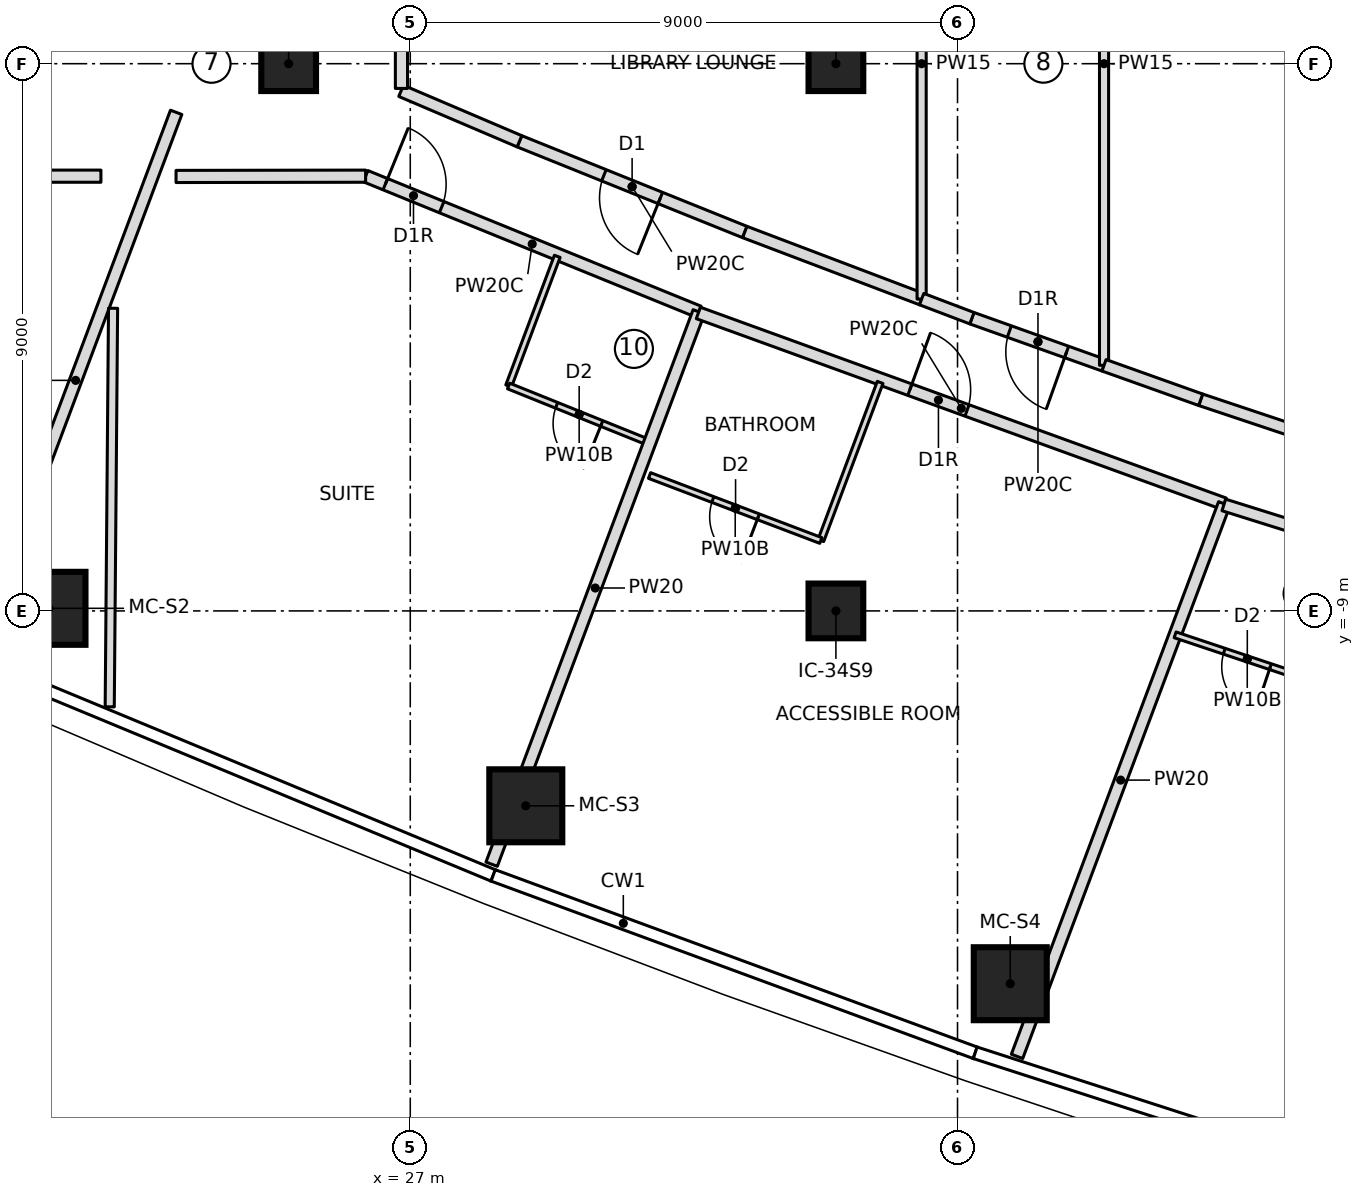
"""IFC4 building model, lengths in metres.
Left out: names, types, materials, properties, quantities, classifications, styles, units other than length and angle.
Written with IfcOpenShell. Run it as: python <this file> out.ifc"""

import sys

from ifc_helpers import new_model, si_unit, direction, frame, frame_2d, origin, origin_2d, place, context, subcontext, project, spatial, rectangle, extrude, element, fill, save


model = new_model("IFC4")
c1 = context("Model", 3, precision=1e-05, world=origin(), true_north=direction((0.0, 1.0)))
c2 = subcontext(c1, "Body", "Model", "MODEL_VIEW")
j1 = project(units=[si_unit("LENGTHUNIT", "METRE"), si_unit("PLANEANGLEUNIT", "RADIAN")], contexts=[c1])
p1 = place(None, origin())
s1 = spatial("IfcSite", under=j1, at=p1, CompositionType="ELEMENT")
p2 = place(p1, origin())
s2 = spatial("IfcBuilding", under=s1, at=p2, CompositionType="ELEMENT")
p3 = place(p2, frame((0.0, 0.0, 238.55)))
s3 = spatial("IfcBuildingStorey", under=s2, at=p3, CompositionType="ELEMENT", Elevation=238.55)
for number, where, z_axis, x_axis in (
    (1, (21.059, -8.958, 0.0), (0.0, 0.0, 1.0), (1.0, 0.0, 0.0)),
    (2, (28.9, -12.205, 0.0), (0.0, 0.0, 1.0), (1.0, 0.0, 0.0)),
    (3, (36.867, -15.132, 0.0), (0.0, 0.0, 1.0), (1.0, 0.0, 0.0)),
):
    element("IfcColumn", number, at=place(p3, frame(where, z_axis=z_axis, x_axis=x_axis)), inside=s3, PredefinedType="COLUMN", context=c2, shape_type="SweptSolid", body=[
        extrude(rectangle(XDim=1.2, YDim=1.2, at=origin_2d()), origin(), (0.0, 0.0, 1.0), 3.55),
    ])
for number, where, z_axis, x_axis in (
    (4, (25.0, 0.0, 0.0), (0.0, 0.0, 1.0), (1.0, 0.0, 0.0)),
    (5, (34.0, -9.0, 0.0), (0.0, 0.0, 1.0), (1.0, 0.0, 0.0)),
    (6, (34.0, 0.0, 0.0), (0.0, 0.0, 1.0), (1.0, 0.0, 0.0)),
):
    element("IfcColumn", number, at=place(p3, frame(where, z_axis=z_axis, x_axis=x_axis)), inside=s3, PredefinedType="COLUMN", context=c2, shape_type="SweptSolid", body=[
        extrude(rectangle(XDim=0.9, YDim=0.9, at=origin_2d()), origin(), (0.0, 0.0, 1.0), 3.55),
    ])
p4 = place(p3, frame((6.725, -1.85, 0.0), z_axis=(0.0, 0.0, 1.0), x_axis=(1.0, 0.0, 0.0)))
e7 = element("IfcWall", 7, at=p4, inside=s3, PredefinedType="PARTITIONING", context=c2, shape_type="SweptSolid", body=[
    extrude(rectangle(XDim=15.188, YDim=0.2, at=frame_2d((7.594, 0.0))), origin(), (0.0, 0.0, 1.0), 3.25),
])
p5 = place(p4, frame((7.257, 0.0, 0.0)))
e8 = element("IfcOpeningElement", 8, at=p5, cuts=e7, PredefinedType="OPENING", context=c2, shape_type="SweptSolid", body=[
    extrude(rectangle(XDim=1.0, YDim=2.1, at=frame_2d((0.5, 1.05))), frame((0.0, 0.11, 0.0), z_axis=(0.0, -1.0, 0.0), x_axis=(1.0, 0.0, 0.0)), (0.0, 0.0, 1.0), 0.22),
])
p6 = place(p3, frame((19.844, -9.616, 0.0), z_axis=(0.0, 0.0, 1.0), x_axis=(0.351123441588, 0.936329177569, 0.0)))
e9 = element("IfcWall", 9, at=p6, inside=s3, PredefinedType="PARTITIONING", context=c2, shape_type="SweptSolid", body=[
    extrude(rectangle(XDim=9.416, YDim=0.2, at=frame_2d((4.708, 0.0))), origin(), (0.0, 0.0, 1.0), 3.25),
])
p7 = place(p3, frame((26.266, -1.85, 0.0), z_axis=(0.0, 0.0, 1.0), x_axis=(0.926191125494, -0.377054371486, 0.0)))
e10 = element("IfcWall", 10, at=p7, inside=s3, PredefinedType="PARTITIONING", context=c2, shape_type="SweptSolid", body=[
    extrude(rectangle(XDim=5.916, YDim=0.2, at=frame_2d((2.958, 0.0))), origin(), (0.0, 0.0, 1.0), 3.25),
])
p8 = place(p7, frame((0.35, 0.0, 0.0)))
e11 = element("IfcOpeningElement", 11, at=p8, cuts=e10, PredefinedType="OPENING", context=c2, shape_type="SweptSolid", body=[
    extrude(rectangle(XDim=1.0, YDim=2.1, at=frame_2d((0.5, 1.05))), frame((0.0, 0.11, 0.0), z_axis=(0.0, -1.0, 0.0), x_axis=(1.0, 0.0, 0.0)), (0.0, 0.0, 1.0), 0.22),
])
p9 = place(p3, frame((28.618, -5.301, 0.0), z_axis=(0.0, 0.0, 1.0), x_axis=(0.351064703731, 0.936351202164, 0.0)))
e12 = element("IfcWall", 12, at=p9, inside=s3, PredefinedType="PARTITIONING", context=c2, shape_type="SweptSolid", body=[
    extrude(rectangle(XDim=2.278, YDim=0.1, at=frame_2d((1.139, 0.0))), origin(), (0.0, 0.0, 1.0), 3.25),
])
p10 = place(p3, frame((30.938, -6.235, 0.0), z_axis=(0.0, 0.0, 1.0), x_axis=(-0.92761232595, 0.373544338394, 0.0)))
e13 = element("IfcWall", 13, at=p10, inside=s3, PredefinedType="PARTITIONING", context=c2, shape_type="SweptSolid", body=[
    extrude(rectangle(XDim=2.5, YDim=0.1, at=frame_2d((1.25, 0.0))), origin(), (0.0, 0.0, 1.0), 3.25),
])
p11 = place(p10, frame((0.85, 0.0, 0.0)))
e14 = element("IfcOpeningElement", 14, at=p11, cuts=e13, PredefinedType="OPENING", context=c2, shape_type="SweptSolid", body=[
    extrude(rectangle(XDim=0.8, YDim=2.1, at=frame_2d((0.4, 1.05))), frame((0.0, 0.06, 0.0), z_axis=(0.0, -1.0, 0.0), x_axis=(1.0, 0.0, 0.0)), (0.0, 0.0, 1.0), 0.12),
])
p12 = place(p3, frame((28.338, -13.166, 0.0), z_axis=(0.0, 0.0, 1.0), x_axis=(0.351126198992, 0.936328143538, 0.0)))
e15 = element("IfcWall", 15, at=p12, inside=s3, PredefinedType="PARTITIONING", context=c2, shape_type="SweptSolid", body=[
    extrude(rectangle(XDim=9.703, YDim=0.2, at=frame_2d((4.852, 0.0))), origin(), (0.0, 0.0, 1.0), 3.25),
])
p13 = place(p3, frame((31.738, -4.1, 0.0), z_axis=(0.0, 0.0, 1.0), x_axis=(0.940010170527, -0.341146419159, 0.0)))
e16 = element("IfcWall", 16, at=p13, inside=s3, PredefinedType="PARTITIONING", context=c2, shape_type="SweptSolid", body=[
    extrude(rectangle(XDim=9.2, YDim=0.2, at=frame_2d((4.6, 0.0))), origin(), (0.0, 0.0, 1.0), 3.25),
])
p14 = place(p13, frame((3.7, 0.0, 0.0)))
e17 = element("IfcOpeningElement", 17, at=p14, cuts=e16, PredefinedType="OPENING", context=c2, shape_type="SweptSolid", body=[
    extrude(rectangle(XDim=1.0, YDim=2.1, at=frame_2d((0.5, 1.05))), frame((0.0, 0.11, 0.0), z_axis=(0.0, -1.0, 0.0), x_axis=(1.0, 0.0, 0.0)), (0.0, 0.0, 1.0), 0.22),
])
p15 = place(p3, frame((34.728, -5.242, 0.0), z_axis=(0.0, 0.0, 1.0), x_axis=(-0.351113807562, -0.936332790272, 0.0)))
e18 = element("IfcWall", 18, at=p15, inside=s3, PredefinedType="PARTITIONING", context=c2, shape_type="SweptSolid", body=[
    extrude(rectangle(XDim=2.777, YDim=0.1, at=frame_2d((1.389, 0.0))), origin(), (0.0, 0.0, 1.0), 3.25),
])
p16 = place(p3, frame((33.752, -7.842, 0.0), z_axis=(0.0, 0.0, 1.0), x_axis=(-0.934929871592, 0.354832545302, 0.0)))
e19 = element("IfcWall", 19, at=p16, inside=s3, PredefinedType="PARTITIONING", context=c2, shape_type="SweptSolid", body=[
    extrude(rectangle(XDim=3.013, YDim=0.1, at=frame_2d((1.506, 0.0))), origin(), (0.0, 0.0, 1.0), 3.25),
])
p17 = place(p16, frame((1.1, 0.0, 0.0)))
e20 = element("IfcOpeningElement", 20, at=p17, cuts=e19, PredefinedType="OPENING", context=c2, shape_type="SweptSolid", body=[
    extrude(rectangle(XDim=0.8, YDim=2.1, at=frame_2d((0.4, 1.05))), frame((0.0, 0.06, 0.0), z_axis=(0.0, -1.0, 0.0), x_axis=(1.0, 0.0, 0.0)), (0.0, 0.0, 1.0), 0.12),
])
p18 = place(p3, frame((36.979, -16.327, 0.0), z_axis=(0.0, 0.0, 1.0), x_axis=(0.351098633881, 0.936338480084, 0.0)))
e21 = element("IfcWall", 21, at=p18, inside=s3, PredefinedType="PARTITIONING", context=c2, shape_type="SweptSolid", body=[
    extrude(rectangle(XDim=9.707, YDim=0.2, at=frame_2d((4.853, 0.0))), origin(), (0.0, 0.0, 1.0), 3.25),
])
p19 = place(p3, frame((41.951, -10.186, 0.0), z_axis=(0.0, 0.0, 1.0), x_axis=(-0.948468383404, 0.316871781141, 0.0)))
e22 = element("IfcWall", 22, at=p19, inside=s3, PredefinedType="PARTITIONING", context=c2, shape_type="SweptSolid", body=[
    extrude(rectangle(XDim=2.502, YDim=0.1, at=frame_2d((1.251, 0.0))), origin(), (0.0, 0.0, 1.0), 3.25),
])
p20 = place(p19, frame((0.85, 0.0, 0.0)))
e23 = element("IfcOpeningElement", 23, at=p20, cuts=e22, PredefinedType="OPENING", context=c2, shape_type="SweptSolid", body=[
    extrude(rectangle(XDim=0.8, YDim=2.1, at=frame_2d((0.4, 1.05))), frame((0.0, 0.06, 0.0), z_axis=(0.0, -1.0, 0.0), x_axis=(1.0, 0.0, 0.0)), (0.0, 0.0, 1.0), 0.12),
])
p21 = place(p3, frame((32.501, -2.768, 0.0), z_axis=(0.0, 0.0, 1.0), x_axis=(-0.927622894464, 0.373518092823, 0.0)))
e24 = element("IfcWall", 24, at=p21, inside=s3, PredefinedType="PARTITIONING", context=c2, shape_type="SweptSolid", body=[
    extrude(rectangle(XDim=3.995, YDim=0.2, at=frame_2d((1.998, 0.0))), origin(), (0.0, 0.0, 1.0), 3.25),
])
p22 = place(p21, frame((1.498, 0.0, 0.0)))
e25 = element("IfcOpeningElement", 25, at=p22, cuts=e24, PredefinedType="OPENING", context=c2, shape_type="SweptSolid", body=[
    extrude(rectangle(XDim=1.0, YDim=2.1, at=frame_2d((0.5, 1.05))), frame((0.0, 0.11, 0.0), z_axis=(0.0, -1.0, 0.0), x_axis=(1.0, 0.0, 0.0)), (0.0, 0.0, 1.0), 0.22),
])
p23 = place(p3, frame((28.796, -1.276, 0.0), z_axis=(0.0, 0.0, 1.0), x_axis=(-0.91990756443, 0.392135273732, 0.0)))
e26 = element("IfcWall", 26, at=p23, inside=s3, PredefinedType="PARTITIONING", context=c2, shape_type="SweptSolid", body=[
    extrude(rectangle(XDim=2.115, YDim=0.2, at=frame_2d((1.058, 0.0))), origin(), (0.0, 0.0, 1.0), 3.25),
])
p24 = place(p3, frame((35.41, -3.872, 0.0), z_axis=(0.0, 0.0, 1.0), x_axis=(-0.934964318004, 0.354741770954, 0.0)))
e27 = element("IfcWall", 27, at=p24, inside=s3, PredefinedType="PARTITIONING", context=c2, shape_type="SweptSolid", body=[
    extrude(rectangle(XDim=3.111, YDim=0.2, at=frame_2d((1.555, 0.0))), origin(), (0.0, 0.0, 1.0), 3.25),
])
p25 = place(p3, frame((35.41, -3.872, 0.0), z_axis=(0.0, 0.0, 1.0), x_axis=(0.0, 1.0, 0.0)))
e28 = element("IfcWall", 28, at=p25, inside=s3, PredefinedType="PARTITIONING", context=c2, shape_type="SweptSolid", body=[
    extrude(rectangle(XDim=7.744, YDim=0.15, at=frame_2d((3.872, 0.0))), origin(), (0.0, 0.0, 1.0), 3.25),
])
p26 = place(p3, frame((38.41, -4.961, 0.0), z_axis=(0.0, 0.0, 1.0), x_axis=(-0.941897392466, 0.335900732459, 0.0)))
e29 = element("IfcWall", 29, at=p26, inside=s3, PredefinedType="PARTITIONING", context=c2, shape_type="SweptSolid", body=[
    extrude(rectangle(XDim=2.308, YDim=0.2, at=frame_2d((1.154, 0.0))), origin(), (0.0, 0.0, 1.0), 3.25),
])
p27 = place(p26, frame((0.654, 0.0, 0.0)))
e30 = element("IfcOpeningElement", 30, at=p27, cuts=e29, PredefinedType="OPENING", context=c2, shape_type="SweptSolid", body=[
    extrude(rectangle(XDim=1.0, YDim=2.1, at=frame_2d((0.5, 1.05))), frame((0.0, 0.11, 0.0), z_axis=(0.0, -1.0, 0.0), x_axis=(1.0, 0.0, 0.0)), (0.0, 0.0, 1.0), 0.22),
])
p28 = place(p3, frame((36.236, -4.186, 0.0), z_axis=(0.0, 0.0, 1.0), x_axis=(-0.934902750064, 0.354903998178, 0.0)))
e31 = element("IfcWall", 31, at=p28, inside=s3, PredefinedType="PARTITIONING", context=c2, shape_type="SweptSolid", body=[
    extrude(rectangle(XDim=0.884, YDim=0.2, at=frame_2d((0.442, 0.0))), origin(), (0.0, 0.0, 1.0), 3.25),
])
p29 = place(p3, frame((38.41, -4.961, 0.0), z_axis=(0.0, 0.0, 1.0), x_axis=(0.0, 1.0, 0.0)))
e32 = element("IfcWall", 32, at=p29, inside=s3, PredefinedType="PARTITIONING", context=c2, shape_type="SweptSolid", body=[
    extrude(rectangle(XDim=9.921, YDim=0.15, at=frame_2d((4.961, 0.0))), origin(), (0.0, 0.0, 1.0), 3.25),
])
p30 = place(p3, frame((42.486, -6.358, 0.0), z_axis=(0.0, 0.0, 1.0), x_axis=(-0.948459565489, 0.316898173918, 0.0)))
e33 = element("IfcWall", 33, at=p30, inside=s3, PredefinedType="PARTITIONING", context=c2, shape_type="SweptSolid", body=[
    extrude(rectangle(XDim=2.622, YDim=0.2, at=frame_2d((1.311, 0.0))), origin(), (0.0, 0.0, 1.0), 3.25),
])
p31 = place(p3, frame((39.999, -5.527, 0.0), z_axis=(0.0, 0.0, 1.0), x_axis=(-0.941925088036, 0.335823061341, 0.0)))
e34 = element("IfcWall", 34, at=p31, inside=s3, PredefinedType="PARTITIONING", context=c2, shape_type="SweptSolid", body=[
    extrude(rectangle(XDim=1.687, YDim=0.2, at=frame_2d((0.844, 0.0))), origin(), (0.0, 0.0, 1.0), 3.25),
])
p32 = place(p3, frame((22.112, -4.023, 0.0), z_axis=(0.0, 0.0, 1.0), x_axis=(-0.008379594055, -0.999964890585, 0.0)))
e35 = element("IfcWall", 35, at=p32, inside=s3, PredefinedType="PARTITIONING", context=c2, shape_type="SweptSolid", body=[
    extrude(rectangle(XDim=6.555, YDim=0.15, at=frame_2d((3.278, 0.0))), origin(), (0.0, 0.0, 1.0), 3.25),
])
p33 = place(p3, frame((40.38, -7.257, 0.0), z_axis=(0.0, 0.0, 1.0), x_axis=(0.954235234728, -0.299057046068, 0.0)))
e36 = element("IfcWall", 36, at=p33, inside=s3, PredefinedType="PARTITIONING", context=c2, shape_type="SweptSolid", body=[
    extrude(rectangle(XDim=8.3, YDim=0.2, at=frame_2d((4.15, 0.0))), origin(), (0.0, 0.0, 1.0), 3.25),
])
p34 = place(p33, frame((2.8, 0.0, 0.0)))
e37 = element("IfcOpeningElement", 37, at=p34, cuts=e36, PredefinedType="OPENING", context=c2, shape_type="SweptSolid", body=[
    extrude(rectangle(XDim=1.5, YDim=2.1, at=frame_2d((0.75, 1.05))), frame((0.0, 0.11, 0.0), z_axis=(0.0, -1.0, 0.0), x_axis=(1.0, 0.0, 0.0)), (0.0, 0.0, 1.0), 0.22),
])
p35 = place(p3, frame((26.855, -0.407, 0.0), z_axis=(0.0, 0.0, 1.0), x_axis=(0.0, 1.0, 0.0)))
e38 = element("IfcWall", 38, at=p35, inside=s3, PredefinedType="PARTITIONING", context=c2, shape_type="SweptSolid", body=[
    extrude(rectangle(XDim=0.814, YDim=0.2, at=frame_2d((0.407, 0.0))), origin(), (0.0, 0.0, 1.0), 3.25),
])
p36 = place(p3, frame((23.148, -1.854, 0.0), z_axis=(0.0, 0.0, 1.0), x_axis=(0.999999006581, 0.001409552241, 0.0)))
e39 = element("IfcWall", 39, at=p36, inside=s3, PredefinedType="PARTITIONING", context=c2, shape_type="SweptSolid", body=[
    extrude(rectangle(XDim=3.118, YDim=0.2, at=frame_2d((1.559, 0.0))), origin(), (0.0, 0.0, 1.0), 3.25),
])
p37 = place(p11, origin())
e40 = element("IfcDoor", 40, at=p37, inside=s3, OperationType="SINGLE_SWING_LEFT", PredefinedType="DOOR", context=c2, shape_type="SweptSolid", body=[
    extrude(rectangle(XDim=0.8, YDim=2.1, at=frame_2d((0.4, 1.05))), frame((0.0, 0.025, 0.0), z_axis=(0.0, -1.0, 0.0), x_axis=(1.0, 0.0, 0.0)), (0.0, 0.0, 1.0), 0.05),
])
fill(e14, e40)
p38 = place(p8, origin())
e41 = element("IfcDoor", 41, at=p38, inside=s3, OperationType="SINGLE_SWING_RIGHT", PredefinedType="DOOR", context=c2, shape_type="SweptSolid", body=[
    extrude(rectangle(XDim=1.0, YDim=2.1, at=frame_2d((0.5, 1.05))), frame((0.0, 0.025, 0.0), z_axis=(0.0, -1.0, 0.0), x_axis=(1.0, 0.0, 0.0)), (0.0, 0.0, 1.0), 0.05),
])
fill(e11, e41)
p39 = place(p17, origin())
e42 = element("IfcDoor", 42, at=p39, inside=s3, OperationType="SINGLE_SWING_LEFT", PredefinedType="DOOR", context=c2, shape_type="SweptSolid", body=[
    extrude(rectangle(XDim=0.8, YDim=2.1, at=frame_2d((0.4, 1.05))), frame((0.0, 0.025, 0.0), z_axis=(0.0, -1.0, 0.0), x_axis=(1.0, 0.0, 0.0)), (0.0, 0.0, 1.0), 0.05),
])
fill(e20, e42)
p40 = place(p14, origin())
e43 = element("IfcDoor", 43, at=p40, inside=s3, OperationType="SINGLE_SWING_RIGHT", PredefinedType="DOOR", context=c2, shape_type="SweptSolid", body=[
    extrude(rectangle(XDim=1.0, YDim=2.1, at=frame_2d((0.5, 1.05))), frame((0.0, 0.025, 0.0), z_axis=(0.0, -1.0, 0.0), x_axis=(1.0, 0.0, 0.0)), (0.0, 0.0, 1.0), 0.05),
])
fill(e17, e43)
p41 = place(p20, origin())
e44 = element("IfcDoor", 44, at=p41, inside=s3, OperationType="SINGLE_SWING_LEFT", PredefinedType="DOOR", context=c2, shape_type="SweptSolid", body=[
    extrude(rectangle(XDim=0.8, YDim=2.1, at=frame_2d((0.4, 1.05))), frame((0.0, 0.025, 0.0), z_axis=(0.0, -1.0, 0.0), x_axis=(1.0, 0.0, 0.0)), (0.0, 0.0, 1.0), 0.05),
])
fill(e23, e44)
p42 = place(p22, origin())
e45 = element("IfcDoor", 45, at=p42, inside=s3, OperationType="SINGLE_SWING_LEFT", PredefinedType="DOOR", context=c2, shape_type="SweptSolid", body=[
    extrude(rectangle(XDim=1.0, YDim=2.1, at=frame_2d((0.5, 1.05))), frame((0.0, 0.025, 0.0), z_axis=(0.0, -1.0, 0.0), x_axis=(1.0, 0.0, 0.0)), (0.0, 0.0, 1.0), 0.05),
])
fill(e25, e45)
p43 = place(p27, origin())
e46 = element("IfcDoor", 46, at=p43, inside=s3, OperationType="SINGLE_SWING_RIGHT", PredefinedType="DOOR", context=c2, shape_type="SweptSolid", body=[
    extrude(rectangle(XDim=1.0, YDim=2.1, at=frame_2d((0.5, 1.05))), frame((0.0, 0.025, 0.0), z_axis=(0.0, -1.0, 0.0), x_axis=(1.0, 0.0, 0.0)), (0.0, 0.0, 1.0), 0.05),
])
fill(e30, e46)
save(model, sys.argv[1])
